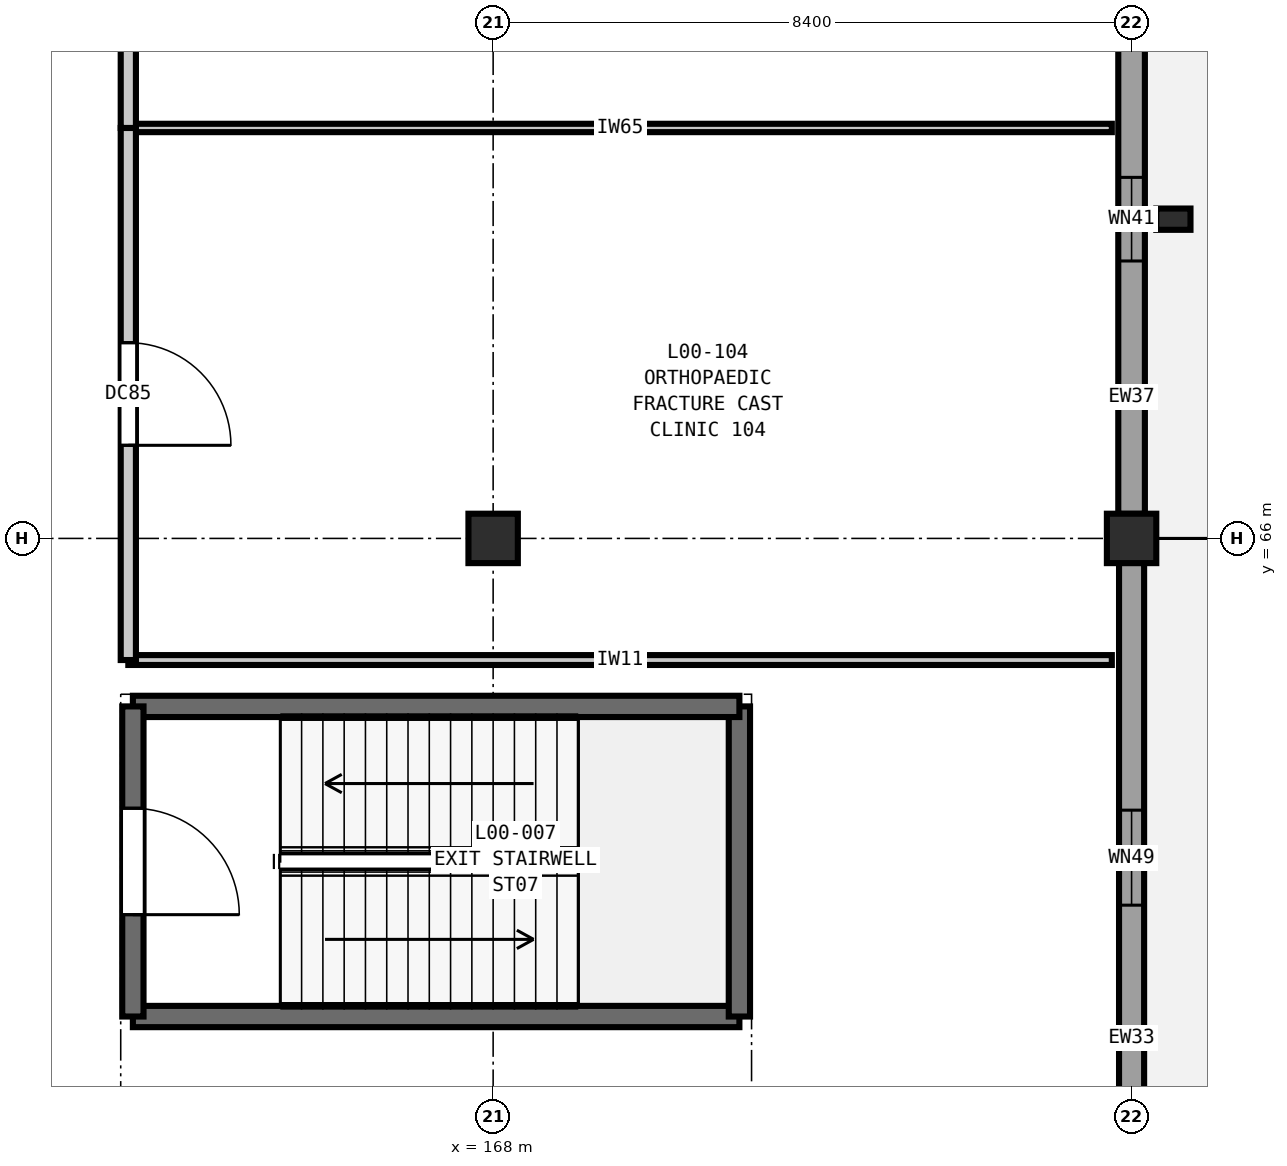
"""IFC4 building model, lengths in metres.
Left out: names, types, materials, properties, quantities, classifications, styles, units other than length and angle.
Written with IfcOpenShell. Run it as: python <this file> out.ifc"""

import sys

from ifc_helpers import new_model, si_unit, direction, frame, frame_2d, origin, origin_2d, place, context, subcontext, project, spatial, rectangle, extrude, element, fill, save


model = new_model("IFC4")
c1 = context("Model", 3, precision=1e-05, world=origin(), true_north=direction((0.0, 1.0)))
c2 = subcontext(c1, "Body", "Model", "MODEL_VIEW")
j1 = project(units=[si_unit("LENGTHUNIT", "METRE"), si_unit("PLANEANGLEUNIT", "RADIAN")], contexts=[c1])
p1 = place(None, origin())
s1 = spatial("IfcSite", under=j1, at=p1, CompositionType="ELEMENT")
p2 = place(p1, origin())
s2 = spatial("IfcBuilding", under=s1, at=p2, CompositionType="ELEMENT")
p3 = place(p2, origin())
s3 = spatial("IfcBuildingStorey", under=s2, at=p3, CompositionType="ELEMENT", Elevation=0.0)
for number, where, z_axis, x_axis in (
    (1, (168.0, 66.0, 0.0), (0.0, 0.0, 1.0), (1.0, 0.0, 0.0)),
    (2, (176.4, 66.0, 0.0), (0.0, 0.0, 1.0), (1.0, 0.0, 0.0)),
):
    element("IfcColumn", number, at=place(p3, frame(where, z_axis=z_axis, x_axis=x_axis)), inside=s3, PredefinedType="COLUMN", context=c2, shape_type="SweptSolid", body=[
        extrude(rectangle(XDim=0.65, YDim=0.65, at=origin_2d()), origin(), (0.0, 0.0, 1.0), 5.4),
    ])
p4 = place(p3, frame((176.95, 70.2, 0.0), z_axis=(0.0, 0.0, 1.0), x_axis=(1.0, 0.0, 0.0)))
e3 = element("IfcColumn", 3, at=p4, inside=s3, PredefinedType="PILASTER", context=c2, shape_type="SweptSolid", body=[
    extrude(rectangle(XDim=0.45, YDim=0.28, at=origin_2d()), origin(), (0.0, 0.0, 1.0), 5.4),
])
p5 = place(p3, frame((176.4, 74.077, 0.0), z_axis=(0.0, 0.0, 1.0), x_axis=(0.0, -1.0, 0.0)))
e4 = element("IfcWall", 4, at=p5, inside=s3, PredefinedType="SOLIDWALL", context=c2, shape_type="SweptSolid", body=[
    extrude(rectangle(XDim=7.754, YDim=0.35, at=frame_2d((3.877, 0.0))), origin(), (0.0, 0.0, 1.0), 4.68),
])
p6 = place(p5, frame((3.327, 0.0, 0.9)))
e5 = element("IfcOpeningElement", 5, at=p6, cuts=e4, PredefinedType="OPENING", context=c2, shape_type="SweptSolid", body=[
    extrude(rectangle(XDim=1.1, YDim=1.95, at=frame_2d((0.55, 0.975))), frame((0.0, 0.185, 0.0), z_axis=(0.0, -1.0, 0.0), x_axis=(1.0, 0.0, 0.0)), (0.0, 0.0, 1.0), 0.37),
])
p7 = place(p3, frame((176.4, 65.677, 0.0), z_axis=(0.0, 0.0, 1.0), x_axis=(0.0, -1.0, 0.0)))
e6 = element("IfcWall", 6, at=p7, inside=s3, PredefinedType="SOLIDWALL", context=c2, shape_type="SweptSolid", body=[
    extrude(rectangle(XDim=7.754, YDim=0.33, at=frame_2d((3.877, 0.0))), origin(), (0.0, 0.0, 1.0), 4.68),
])
p8 = place(p7, frame((3.252, 0.0, 0.9)))
e7 = element("IfcOpeningElement", 7, at=p8, cuts=e6, PredefinedType="OPENING", context=c2, shape_type="SweptSolid", body=[
    extrude(rectangle(XDim=1.25, YDim=1.95, at=frame_2d((0.625, 0.975))), frame((0.0, 0.175, 0.0), z_axis=(0.0, -1.0, 0.0), x_axis=(1.0, 0.0, 0.0)), (0.0, 0.0, 1.0), 0.35),
])
p9 = place(p3, frame((163.26, 59.71, 0.0), z_axis=(0.0, 0.0, 1.0), x_axis=(1.0, 0.0, 0.0)))
e8 = element("IfcWall", 8, at=p9, inside=s3, PredefinedType="SHEAR", context=c2, shape_type="SweptSolid", body=[
    extrude(rectangle(XDim=7.98, YDim=0.28, at=frame_2d((3.99, 0.0))), origin(), (0.0, 0.0, 1.0), 5.4),
])
p10 = place(p3, frame((171.24, 59.71, 0.0), z_axis=(0.0, 0.0, 1.0), x_axis=(0.0, 1.0, 0.0)))
e9 = element("IfcWall", 9, at=p10, inside=s3, PredefinedType="SHEAR", context=c2, shape_type="SweptSolid", body=[
    extrude(rectangle(XDim=4.08, YDim=0.28, at=frame_2d((2.04, 0.0))), origin(), (0.0, 0.0, 1.0), 5.4),
])
p11 = place(p3, frame((171.24, 63.79, 0.0), z_axis=(0.0, 0.0, 1.0), x_axis=(-1.0, 0.0, 0.0)))
e10 = element("IfcWall", 10, at=p11, inside=s3, PredefinedType="SHEAR", context=c2, shape_type="SweptSolid", body=[
    extrude(rectangle(XDim=7.98, YDim=0.28, at=frame_2d((3.99, 0.0))), origin(), (0.0, 0.0, 1.0), 5.4),
])
p12 = place(p3, frame((163.26, 63.79, 0.0), z_axis=(0.0, 0.0, 1.0), x_axis=(0.0, -1.0, 0.0)))
e11 = element("IfcWall", 11, at=p12, inside=s3, PredefinedType="SHEAR", context=c2, shape_type="SweptSolid", body=[
    extrude(rectangle(XDim=4.08, YDim=0.28, at=frame_2d((2.04, 0.0))), origin(), (0.0, 0.0, 1.0), 5.4),
])
p13 = place(p12, frame((1.34, 0.0, 0.0)))
e12 = element("IfcOpeningElement", 12, at=p13, cuts=e11, PredefinedType="OPENING", context=c2, shape_type="SweptSolid", body=[
    extrude(rectangle(XDim=1.4, YDim=2.2, at=frame_2d((0.7, 1.1))), frame((0.0, 0.15, 0.0), z_axis=(0.0, -1.0, 0.0), x_axis=(1.0, 0.0, 0.0)), (0.0, 0.0, 1.0), 0.3),
])
p14 = place(p3, frame((163.2, 64.4, 0.0), z_axis=(0.0, 0.0, 1.0), x_axis=(1.0, 0.0, 0.0)))
e13 = element("IfcWall", 13, at=p14, inside=s3, PredefinedType="PARTITIONING", context=c2, shape_type="SweptSolid", body=[
    extrude(rectangle(XDim=12.94, YDim=0.13, at=frame_2d((6.47, 0.0))), origin(), (0.0, 0.0, 1.0), 5.04),
])
p15 = place(p3, frame((163.2, 71.4, 0.0), z_axis=(0.0, 0.0, 1.0), x_axis=(1.0, 0.0, 0.0)))
e14 = element("IfcWall", 14, at=p15, inside=s3, PredefinedType="PARTITIONING", context=c2, shape_type="SweptSolid", body=[
    extrude(rectangle(XDim=12.94, YDim=0.11, at=frame_2d((6.47, 0.0))), origin(), (0.0, 0.0, 1.0), 5.04),
])
p16 = place(p3, frame((163.2, 64.4, 0.0), z_axis=(0.0, 0.0, 1.0), x_axis=(0.0, 1.0, 0.0)))
e15 = element("IfcWall", 15, at=p16, inside=s3, PredefinedType="PARTITIONING", context=c2, shape_type="SweptSolid", body=[
    extrude(rectangle(XDim=7.0, YDim=0.2, at=frame_2d((3.5, 0.0))), origin(), (0.0, 0.0, 1.0), 5.04),
])
p17 = place(p16, frame((2.825, 0.0, 0.0)))
e16 = element("IfcOpeningElement", 16, at=p17, cuts=e15, PredefinedType="OPENING", context=c2, shape_type="SweptSolid", body=[
    extrude(rectangle(XDim=1.35, YDim=2.2, at=frame_2d((0.675, 1.1))), frame((0.0, 0.11, 0.0), z_axis=(0.0, -1.0, 0.0), x_axis=(1.0, 0.0, 0.0)), (0.0, 0.0, 1.0), 0.22),
])
p18 = place(p3, frame((163.2, 71.4, 0.0), z_axis=(0.0, 0.0, 1.0), x_axis=(0.0, 1.0, 0.0)))
e17 = element("IfcWall", 17, at=p18, inside=s3, PredefinedType="PARTITIONING", context=c2, shape_type="SweptSolid", body=[
    extrude(rectangle(XDim=11.4, YDim=0.2, at=frame_2d((5.7, 0.0))), origin(), (0.0, 0.0, 1.0), 5.04),
])
p19 = place(p18, frame((4.975, 0.0, 0.0)))
e18 = element("IfcOpeningElement", 18, at=p19, cuts=e17, PredefinedType="OPENING", context=c2, shape_type="SweptSolid", body=[
    extrude(rectangle(XDim=1.45, YDim=2.25, at=frame_2d((0.725, 1.125))), frame((0.0, 0.11, 0.0), z_axis=(0.0, -1.0, 0.0), x_axis=(1.0, 0.0, 0.0)), (0.0, 0.0, 1.0), 0.22),
])
p20 = place(p6, origin())
e19 = element("IfcWindow", 19, at=p20, inside=s3, PartitioningType="SINGLE_PANEL", PredefinedType="WINDOW", context=c2, shape_type="SweptSolid", body=[
    extrude(rectangle(XDim=1.1, YDim=1.95, at=frame_2d((0.55, 0.975))), frame((0.0, 0.03, 0.0), z_axis=(0.0, -1.0, 0.0), x_axis=(1.0, 0.0, 0.0)), (0.0, 0.0, 1.0), 0.06),
])
fill(e5, e19)
p21 = place(p8, origin())
e20 = element("IfcWindow", 20, at=p21, inside=s3, PartitioningType="SINGLE_PANEL", PredefinedType="WINDOW", context=c2, shape_type="SweptSolid", body=[
    extrude(rectangle(XDim=1.25, YDim=1.95, at=frame_2d((0.625, 0.975))), frame((0.0, 0.03, 0.0), z_axis=(0.0, -1.0, 0.0), x_axis=(1.0, 0.0, 0.0)), (0.0, 0.0, 1.0), 0.06),
])
fill(e7, e20)
p22 = place(p13, origin())
e21 = element("IfcDoor", 21, at=p22, inside=s3, OperationType="SINGLE_SWING_RIGHT", PredefinedType="DOOR", context=c2, shape_type="SweptSolid", body=[
    extrude(rectangle(XDim=1.4, YDim=2.2, at=frame_2d((0.7, 1.1))), frame((0.0, 0.025, 0.0), z_axis=(0.0, -1.0, 0.0), x_axis=(1.0, 0.0, 0.0)), (0.0, 0.0, 1.0), 0.05),
])
fill(e12, e21)
p23 = place(p17, frame((1.35, 0.0, 0.0), z_axis=(0.0, 0.0, 1.0), x_axis=(-1.0, 0.0, 0.0)))
e22 = element("IfcDoor", 22, at=p23, inside=s3, OperationType="SINGLE_SWING_RIGHT", PredefinedType="DOOR", context=c2, shape_type="SweptSolid", body=[
    extrude(rectangle(XDim=1.35, YDim=2.2, at=frame_2d((0.675, 1.1))), frame((0.0, 0.025, 0.0), z_axis=(0.0, -1.0, 0.0), x_axis=(1.0, 0.0, 0.0)), (0.0, 0.0, 1.0), 0.05),
])
fill(e16, e22)
save(model, sys.argv[1])
